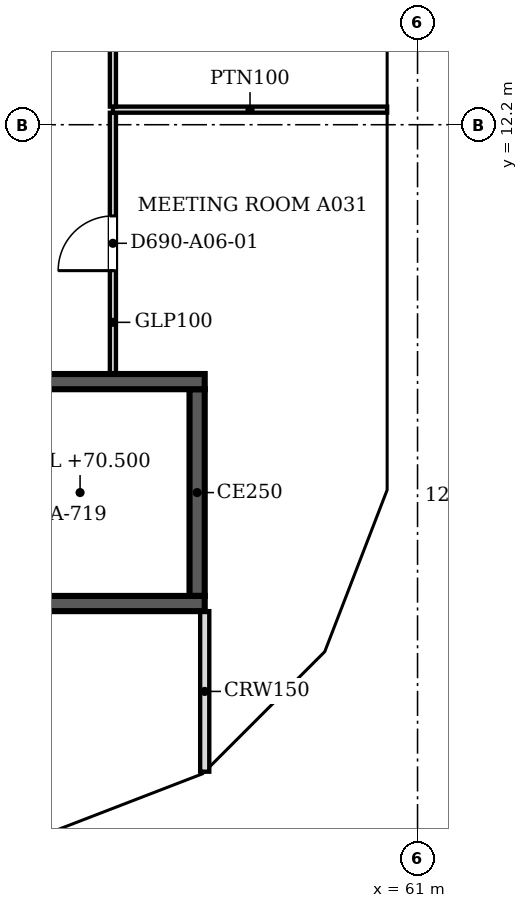
"""IFC4 building model, lengths in metres.
Left out: names, types, materials, properties, quantities, classifications, styles, units other than length and angle.
Written with IfcOpenShell. Run it as: python <this file> out.ifc"""

import sys

from ifc_helpers import new_model, si_unit, direction, frame, frame_2d, origin, place, context, subcontext, project, spatial, polyline, rectangle, outline, extrude, faceted_brep, source, transform, mapped, element, fill, save


model = new_model("IFC4")
c1 = context("Model", 3, precision=1e-05, world=origin(), true_north=direction((0.0, 1.0)))
c2 = subcontext(c1, "Body", "Model", "MODEL_VIEW")
j1 = project(units=[si_unit("LENGTHUNIT", "METRE"), si_unit("PLANEANGLEUNIT", "RADIAN")], contexts=[c1])
p1 = place(None, origin())
s1 = spatial("IfcSite", under=j1, at=p1, CompositionType="ELEMENT")
p2 = place(p1, origin())
s2 = spatial("IfcBuilding", under=s1, at=p2, CompositionType="ELEMENT")
p3 = place(p2, frame((0.0, 0.0, 68.6)))
s3 = spatial("IfcBuildingStorey", under=s2, at=p3, CompositionType="ELEMENT", Elevation=68.6)
m1 = source(origin(), c2, "Body", "Brep", [
    faceted_brep([(2.997, -0.25, 0.0), (0.047, -0.25, 3.8), (0.0, -0.25, 3.741), (0.0, -0.25, 0.0), (0.093, 0.25, 3.74), (2.944, 0.25, 0.068), (2.944, 0.25, 0.0), (0.093, 0.25, 0.0), (0.047, 0.0, 3.8), (2.997, 0.0, 0.0)], [[[0, 1, 2, 3]], [[4, 5, 6, 7]], [[5, 4, 8, 1, 0, 9]], [[2, 1, 8]], [[7, 6, 9, 0, 3]], [[7, 3, 2, 8, 4]], [[9, 6, 5]]]),
])
p4 = place(p3, frame((54.81, 0.233, 0.0), z_axis=(0.0, 0.0, 1.0), x_axis=(0.932990326376, 0.359901446078, 0.0)))
e1 = element("IfcWall", 1, at=p4, inside=s3, PredefinedType="SOLIDWALL", context=c2, shape_type="MappedRepresentation", body=[
    mapped(m1, transform((0.0, 0.0, 0.0), scale=1.0)),
])
m2 = source(origin(), c2, "Body", "SweptSolid", [
    extrude(outline(polyline([(2.487, 0.25), (0.247, 3.135), (0.247, 0.25), (2.487, 0.25)])), frame((0.0, 0.26, 0.0), z_axis=(0.0, -1.0, 0.0), x_axis=(1.0, 0.0, 0.0)), (0.0, 0.0, 1.0), 0.52),
])
p5 = place(p4, origin())
e2 = element("IfcOpeningElement", 2, at=p5, cuts=e1, PredefinedType="OPENING", context=c2, shape_type="MappedRepresentation", body=[
    mapped(m2, transform((0.0, 0.0, 0.0), scale=1.0)),
])
m3 = source(origin(), c2, "Body", "Brep", [
    faceted_brep([(2.997, -0.25, 3.732), (2.944, -0.25, 3.8), (0.0, -0.25, 0.0), (2.997, -0.25, 0.0), (0.053, 0.25, 0.068), (2.891, 0.25, 3.732), (2.891, 0.25, 0.0), (0.053, 0.25, 0.0), (2.944, 0.0, 3.8), (0.0, 0.0, 0.0)], [[[0, 1, 2, 3]], [[4, 5, 6, 7]], [[8, 1, 0]], [[5, 4, 9, 2, 1, 8]], [[7, 6, 3, 2, 9]], [[7, 9, 4]], [[3, 6, 5, 8, 0]]]),
])
p6 = place(p3, frame((57.606, 1.312, 0.0), z_axis=(0.0, 0.0, 1.0), x_axis=(0.707147509625, 0.707066050402, 0.0)))
e3 = element("IfcWall", 3, at=p6, inside=s3, PredefinedType="SOLIDWALL", context=c2, shape_type="MappedRepresentation", body=[
    mapped(m3, transform((0.0, 0.0, 0.0), scale=1.0)),
])
m4 = source(origin(), c2, "Body", "SweptSolid", [
    extrude(outline(polyline([(2.744, 3.134), (0.51, 0.25), (2.744, 0.25), (2.744, 3.134)])), frame((0.0, 0.26, 0.0), z_axis=(0.0, -1.0, 0.0), x_axis=(1.0, 0.0, 0.0)), (0.0, 0.0, 1.0), 0.52),
])
p7 = place(p6, origin())
e4 = element("IfcOpeningElement", 4, at=p7, cuts=e3, PredefinedType="OPENING", context=c2, shape_type="MappedRepresentation", body=[
    mapped(m4, transform((0.0, 0.0, 0.0), scale=1.0)),
])
m5 = source(origin(), c2, "Body", "Brep", [
    faceted_brep([(3.003, -0.25, 0.0), (0.053, -0.25, 3.8), (0.0, -0.25, 3.731), (0.0, -0.25, 0.0), (0.106, 0.25, 3.732), (2.957, 0.25, 0.06), (2.957, 0.25, 0.0), (0.106, 0.25, 0.0), (0.053, 0.0, 3.8), (3.003, 0.0, 0.0)], [[[0, 1, 2, 3]], [[4, 5, 6, 7]], [[5, 4, 8, 1, 0, 9]], [[2, 1, 8]], [[7, 6, 9, 0, 3]], [[7, 3, 2, 8, 4]], [[9, 6, 5]]]),
])
p8 = place(p3, frame((59.669, 3.344, 0.0), z_axis=(0.0, 0.0, 1.0), x_axis=(0.35992665181, 0.932980602862, 0.0)))
e5 = element("IfcWall", 5, at=p8, inside=s3, PredefinedType="SOLIDWALL", context=c2, shape_type="MappedRepresentation", body=[
    mapped(m5, transform((0.0, 0.0, 0.0), scale=1.0)),
])
m6 = source(origin(), c2, "Body", "SweptSolid", [
    extrude(outline(polyline([(2.493, 0.25), (0.253, 3.135), (0.253, 0.25), (2.493, 0.25)])), frame((0.0, 0.26, 0.0), z_axis=(0.0, -1.0, 0.0), x_axis=(1.0, 0.0, 0.0)), (0.0, 0.0, 1.0), 0.52),
])
p9 = place(p8, origin())
e6 = element("IfcOpeningElement", 6, at=p9, cuts=e5, PredefinedType="OPENING", context=c2, shape_type="MappedRepresentation", body=[
    mapped(m6, transform((0.0, 0.0, 0.0), scale=1.0)),
])
m7 = source(origin(), c2, "Body", "Brep", [
    faceted_brep([(6.053, -0.25, 0.0), (3.003, -0.25, 3.8), (0.0, -0.25, 0.0), (0.047, 0.25, 0.059), (3.003, 0.25, 3.8), (6.053, 0.25, 0.0), (0.047, 0.25, 0.0), (0.0, 0.0, 0.0)], [[[0, 1, 2]], [[3, 4, 5, 6]], [[5, 4, 1, 0]], [[4, 3, 7, 2, 1]], [[6, 5, 0, 2, 7]], [[6, 7, 3]]]),
])
p10 = place(p3, frame((60.75, 6.146, 0.0), z_axis=(0.0, 0.0, 1.0), x_axis=(0.0, 1.0, 0.0)))
e7 = element("IfcWall", 7, at=p10, inside=s3, PredefinedType="SOLIDWALL", context=c2, shape_type="MappedRepresentation", body=[
    mapped(m7, transform((0.0, 0.0, 0.0), scale=1.0)),
])
m8 = source(origin(), c2, "Body", "SweptSolid", [
    extrude(outline(polyline([(5.532, 0.25), (3.005, 3.399), (0.516, 0.25), (5.532, 0.25)])), frame((0.0, 0.26, 0.0), z_axis=(0.0, -1.0, 0.0), x_axis=(1.0, 0.0, 0.0)), (0.0, 0.0, 1.0), 0.52),
])
p11 = place(p10, origin())
e8 = element("IfcOpeningElement", 8, at=p11, cuts=e7, PredefinedType="OPENING", context=c2, shape_type="MappedRepresentation", body=[
    mapped(m8, transform((0.0, 0.0, 0.0), scale=1.0)),
])
m9 = source(origin(), c2, "Body", "SweptSolid", [
    extrude(outline(polyline([(6.1, 0.0), (3.05, 3.8), (0.0, 0.0), (6.1, 0.0)])), frame((0.0, 0.25, 0.0), z_axis=(0.0, -1.0, 0.0), x_axis=(1.0, 0.0, 0.0)), (0.0, 0.0, 1.0), 0.5),
])
p12 = place(p3, frame((60.75, 12.2, 0.0), z_axis=(0.0, 0.0, 1.0), x_axis=(0.0, 1.0, 0.0)))
e9 = element("IfcWall", 9, at=p12, inside=s3, PredefinedType="SOLIDWALL", context=c2, shape_type="MappedRepresentation", body=[
    mapped(m9, transform((0.0, 0.0, 0.0), scale=1.0)),
])
m10 = source(origin(), c2, "Body", "SweptSolid", [
    extrude(outline(polyline([(5.579, 0.25), (3.05, 3.4), (0.521, 0.25), (5.579, 0.25)])), frame((0.0, 0.26, 0.0), z_axis=(0.0, -1.0, 0.0), x_axis=(1.0, 0.0, 0.0)), (0.0, 0.0, 1.0), 0.52),
])
p13 = place(p12, origin())
e10 = element("IfcOpeningElement", 10, at=p13, cuts=e9, PredefinedType="OPENING", context=c2, shape_type="MappedRepresentation", body=[
    mapped(m10, transform((0.0, 0.0, 0.0), scale=1.0)),
])
p14 = place(p2, frame((0.0, 0.0, 72.4)))
s4 = spatial("IfcBuildingStorey", under=s2, at=p14, CompositionType="ELEMENT", Elevation=72.4)
m11 = source(origin(), c2, "Body", "Brep", [
    faceted_brep([(2.95, -0.25, 0.0), (3.003, -0.25, 0.068), (3.003, -0.25, 7.531), (2.95, -0.25, 7.6), (0.0, -0.25, 3.8), (0.047, 0.25, 3.86), (2.898, 0.25, 7.532), (2.898, 0.25, 0.068), (0.047, 0.25, 3.74), (2.95, 0.0, 0.0), (2.95, 0.0, 7.6), (0.0, 0.0, 3.8)], [[[0, 1, 2, 3, 4]], [[5, 6, 7, 8]], [[1, 0, 9]], [[10, 3, 2]], [[6, 5, 11, 4, 3, 10]], [[8, 7, 9, 0, 4, 11]], [[8, 11, 5]], [[1, 9, 7, 6, 10, 2]]]),
])
p15 = place(p14, frame((54.854, 0.25, -3.8), z_axis=(0.0, 0.0, 1.0), x_axis=(0.932970071518, 0.359953949349, 0.0)))
e11 = element("IfcWall", 11, at=p15, inside=s4, PredefinedType="SOLIDWALL", context=c2, shape_type="MappedRepresentation", body=[
    mapped(m11, transform((0.0, 0.0, 0.0), scale=1.0)),
])
m12 = source(origin(), c2, "Body", "SweptSolid", [
    extrude(outline(polyline([(2.75, 6.935), (0.316, 3.8), (2.75, 0.665), (2.75, 6.935)])), frame((0.0, 0.26, 0.0), z_axis=(0.0, -1.0, 0.0), x_axis=(1.0, 0.0, 0.0)), (0.0, 0.0, 1.0), 0.52),
])
p16 = place(p15, origin())
e12 = element("IfcOpeningElement", 12, at=p16, cuts=e11, PredefinedType="OPENING", context=c2, shape_type="MappedRepresentation", body=[
    mapped(m12, transform((0.0, 0.0, 0.0), scale=1.0)),
])
m13 = source(origin(), c2, "Body", "Brep", [
    faceted_brep([(0.053, -0.25, 0.0), (2.997, -0.25, 3.8), (0.053, -0.25, 7.6), (0.0, -0.25, 7.532), (0.0, -0.25, 0.068), (0.106, 0.25, 7.531), (2.944, 0.25, 3.868), (2.944, 0.25, 3.732), (0.106, 0.25, 0.068), (2.997, 0.0, 3.8), (0.053, 0.0, 0.0), (0.053, 0.0, 7.6)], [[[0, 1, 2, 3, 4]], [[5, 6, 7, 8]], [[8, 7, 9, 1, 0, 10]], [[6, 5, 11, 2, 1, 9]], [[3, 2, 11]], [[10, 0, 4]], [[8, 10, 4, 3, 11, 5]], [[9, 7, 6]]]),
])
p17 = place(p14, frame((57.569, 1.274, -3.8), z_axis=(0.0, 0.0, 1.0), x_axis=(0.707066050402, 0.707147509625, 0.0)))
e13 = element("IfcWall", 13, at=p17, inside=s4, PredefinedType="SOLIDWALL", context=c2, shape_type="MappedRepresentation", body=[
    mapped(m13, transform((0.0, 0.0, 0.0), scale=1.0)),
])
m14 = source(origin(), c2, "Body", "SweptSolid", [
    extrude(outline(polyline([(0.253, 0.666), (2.681, 3.8), (0.253, 6.934), (0.253, 0.666)])), frame((0.0, 0.26, 0.0), z_axis=(0.0, -1.0, 0.0), x_axis=(1.0, 0.0, 0.0)), (0.0, 0.0, 1.0), 0.52),
])
p18 = place(p17, origin())
e14 = element("IfcOpeningElement", 14, at=p18, cuts=e13, PredefinedType="OPENING", context=c2, shape_type="MappedRepresentation", body=[
    mapped(m14, transform((0.0, 0.0, 0.0), scale=1.0)),
])
m15 = source(origin(), c2, "Body", "Brep", [
    faceted_brep([(2.95, -0.25, 0.0), (2.997, -0.25, 0.059), (2.997, -0.25, 7.541), (2.95, -0.25, 7.6), (0.0, -0.25, 3.8), (0.053, 0.25, 3.868), (2.904, 0.25, 7.54), (2.904, 0.25, 0.06), (0.053, 0.25, 3.732), (2.95, 0.0, 0.0), (2.95, 0.0, 7.6), (0.0, 0.0, 3.8)], [[[0, 1, 2, 3, 4]], [[5, 6, 7, 8]], [[1, 0, 9]], [[10, 3, 2]], [[6, 5, 11, 4, 3, 10]], [[8, 7, 9, 0, 4, 11]], [[8, 11, 5]], [[1, 9, 7, 6, 10, 2]]]),
])
p19 = place(p14, frame((59.688, 3.394, -3.8), z_axis=(0.0, 0.0, 1.0), x_axis=(0.359972353723, 0.932962970624, 0.0)))
e15 = element("IfcWall", 15, at=p19, inside=s4, PredefinedType="SOLIDWALL", context=c2, shape_type="MappedRepresentation", body=[
    mapped(m15, transform((0.0, 0.0, 0.0), scale=1.0)),
])
p20 = place(p19, origin())
e16 = element("IfcOpeningElement", 16, at=p20, cuts=e15, PredefinedType="OPENING", context=c2, shape_type="MappedRepresentation", body=[
    mapped(m12, transform((0.0, 0.0, 0.0), scale=1.0)),
])
m16 = source(origin(), c2, "Body", "Brep", [
    faceted_brep([(0.047, -0.25, 0.0), (3.05, -0.25, 3.8), (0.047, -0.25, 7.6), (0.0, -0.25, 7.54), (0.0, -0.25, 0.06), (0.093, 0.25, 7.541), (3.05, 0.25, 3.8), (0.093, 0.25, 0.059), (0.047, 0.0, 0.0), (0.047, 0.0, 7.6)], [[[0, 1, 2, 3, 4]], [[5, 6, 7]], [[7, 6, 1, 0, 8]], [[6, 5, 9, 2, 1]], [[3, 2, 9]], [[8, 0, 4]], [[7, 8, 4, 3, 9, 5]]]),
])
p21 = place(p14, frame((60.75, 6.1, -3.8), z_axis=(0.0, 0.0, 1.0), x_axis=(0.0, 1.0, 0.0)))
e17 = element("IfcWall", 17, at=p21, inside=s4, PredefinedType="SOLIDWALL", context=c2, shape_type="MappedRepresentation", body=[
    mapped(m16, transform((0.0, 0.0, 0.0), scale=1.0)),
])
m17 = source(origin(), c2, "Body", "SweptSolid", [
    extrude(outline(polyline([(0.247, 0.656), (2.731, 3.8), (0.247, 6.944), (0.247, 0.656)])), frame((0.0, 0.26, 0.0), z_axis=(0.0, -1.0, 0.0), x_axis=(1.0, 0.0, 0.0)), (0.0, 0.0, 1.0), 0.52),
])
p22 = place(p21, origin())
e18 = element("IfcOpeningElement", 18, at=p22, cuts=e17, PredefinedType="OPENING", context=c2, shape_type="MappedRepresentation", body=[
    mapped(m17, transform((0.0, 0.0, 0.0), scale=1.0)),
])
m18 = source(origin(), c2, "Body", "SweptSolid", [
    extrude(outline(polyline([(3.05, 0.0), (6.1, 3.8), (3.05, 7.6), (0.0, 3.8), (3.05, 0.0)])), frame((0.0, 0.25, 0.0), z_axis=(0.0, -1.0, 0.0), x_axis=(1.0, 0.0, 0.0)), (0.0, 0.0, 1.0), 0.5),
])
p23 = place(p14, frame((60.75, 9.15, -3.8), z_axis=(0.0, 0.0, 1.0), x_axis=(0.0, 1.0, 0.0)))
e19 = element("IfcWall", 19, at=p23, inside=s4, PredefinedType="SOLIDWALL", context=c2, shape_type="MappedRepresentation", body=[
    mapped(m18, transform((0.0, 0.0, 0.0), scale=1.0)),
])
m19 = source(origin(), c2, "Body", "SweptSolid", [
    extrude(outline(polyline([(3.05, 0.399), (5.78, 3.8), (3.05, 7.2), (0.321, 3.8), (3.05, 0.399)])), frame((0.0, 0.26, 0.0), z_axis=(0.0, -1.0, 0.0), x_axis=(1.0, 0.0, 0.0)), (0.0, 0.0, 1.0), 0.52),
])
p24 = place(p23, origin())
e20 = element("IfcOpeningElement", 20, at=p24, cuts=e19, PredefinedType="OPENING", context=c2, shape_type="MappedRepresentation", body=[
    mapped(m19, transform((0.0, 0.0, 0.0), scale=1.0)),
])
p25 = place(p3, frame((57.5, 4.325, 0.0), z_axis=(0.0, 0.0, 1.0), x_axis=(-1.0, 0.0, 0.0)))
e21 = element("IfcWall", 21, at=p25, inside=s3, PredefinedType="SOLIDWALL", context=c2, shape_type="SweptSolid", body=[
    extrude(rectangle(XDim=8.5, YDim=0.25, at=frame_2d((4.25, 0.0))), origin(), (0.0, 0.0, 1.0), 3.8),
])
m20 = source(origin(), c2, "Body", "SweptSolid", [
    extrude(rectangle(XDim=1.2, YDim=2.1, at=frame_2d((0.6, 1.05))), frame((0.0, 0.135, 0.0), z_axis=(0.0, -1.0, 0.0), x_axis=(1.0, 0.0, 0.0)), (0.0, 0.0, 1.0), 0.27),
])
p26 = place(p25, frame((6.9, 0.0, 0.0)))
e22 = element("IfcOpeningElement", 22, at=p26, cuts=e21, PredefinedType="OPENING", context=c2, shape_type="MappedRepresentation", body=[
    mapped(m20, transform((0.0, 0.0, 0.0), scale=1.0)),
])
p27 = place(p3, frame((49.0, 7.975, 0.0), z_axis=(0.0, 0.0, 1.0), x_axis=(1.0, 0.0, 0.0)))
e23 = element("IfcWall", 23, at=p27, inside=s3, PredefinedType="SOLIDWALL", context=c2, shape_type="SweptSolid", body=[
    extrude(rectangle(XDim=8.5, YDim=0.25, at=frame_2d((4.25, 0.0))), origin(), (0.0, 0.0, 1.0), 3.8),
])
p28 = place(p3, frame((57.375, 7.85, 0.0), z_axis=(0.0, 0.0, 1.0), x_axis=(0.0, -1.0, 0.0)))
e24 = element("IfcWall", 24, at=p28, inside=s3, PredefinedType="SOLIDWALL", context=c2, shape_type="SweptSolid", body=[
    extrude(rectangle(XDim=3.4, YDim=0.25, at=frame_2d((1.7, 0.0))), origin(), (0.0, 0.0, 1.0), 3.8),
])
p29 = place(p3, frame((57.5, 1.559, 0.0), z_axis=(0.0, 0.0, 1.0), x_axis=(0.0, 1.0, 0.0)))
e25 = element("IfcWall", 25, at=p29, inside=s3, PredefinedType="PARTITIONING", context=c2, shape_type="SweptSolid", body=[
    extrude(rectangle(XDim=2.641, YDim=0.15, at=frame_2d((1.32, 0.0))), origin(), (0.0, 0.0, 1.0), 3.067),
])
p30 = place(p3, frame((55.99, 12.397, 0.0), z_axis=(0.0, 0.0, 1.0), x_axis=(0.0, -1.0, 0.0)))
e26 = element("IfcWall", 26, at=p30, inside=s3, PredefinedType="PARTITIONING", context=c2, shape_type="SweptSolid", body=[
    extrude(rectangle(XDim=4.297, YDim=0.1, at=frame_2d((2.148, 0.0))), origin(), (0.0, 0.0, 1.0), 3.067),
])
m21 = source(origin(), c2, "Body", "SweptSolid", [
    extrude(rectangle(XDim=0.9, YDim=2.1, at=frame_2d((0.45, 1.05))), frame((0.0, 0.06, 0.0), z_axis=(0.0, -1.0, 0.0), x_axis=(1.0, 0.0, 0.0)), (0.0, 0.0, 1.0), 0.12),
])
p31 = place(p30, frame((1.697, 0.0, 0.0)))
e27 = element("IfcOpeningElement", 27, at=p31, cuts=e26, PredefinedType="OPENING", context=c2, shape_type="MappedRepresentation", body=[
    mapped(m21, transform((0.0, 0.0, 0.0), scale=1.0)),
])
p32 = place(p3, frame((55.99, 12.448, 0.0), z_axis=(0.0, 0.0, 1.0), x_axis=(1.0, 0.0, 0.0)))
e28 = element("IfcWall", 28, at=p32, inside=s3, PredefinedType="PARTITIONING", context=c2, shape_type="SweptSolid", body=[
    extrude(rectangle(XDim=4.51, YDim=0.1, at=frame_2d((2.255, 0.0))), origin(), (0.0, 0.0, 1.0), 3.067),
])
p33 = place(p3, frame((55.99, 17.024, 0.0), z_axis=(0.0, 0.0, 1.0), x_axis=(0.0, -1.0, 0.0)))
e29 = element("IfcWall", 29, at=p33, inside=s3, PredefinedType="PARTITIONING", context=c2, shape_type="SweptSolid", body=[
    extrude(rectangle(XDim=4.525, YDim=0.1, at=frame_2d((2.263, 0.0))), origin(), (0.0, 0.0, 1.0), 3.067),
])
p34 = place(p33, frame((1.825, 0.0, 0.0)))
e30 = element("IfcOpeningElement", 30, at=p34, cuts=e29, PredefinedType="OPENING", context=c2, shape_type="MappedRepresentation", body=[
    mapped(m21, transform((0.0, 0.0, 0.0), scale=1.0)),
])
m22 = source(origin(), c2, "Body", "SweptSolid", [
    extrude(rectangle(XDim=0.9, YDim=2.1, at=frame_2d((0.45, 1.05))), frame((0.0, 0.025, 0.0), z_axis=(0.0, -1.0, 0.0), x_axis=(1.0, 0.0, 0.0)), (0.0, 0.0, 1.0), 0.05),
])
p35 = place(p31, origin())
e31 = element("IfcDoor", 31, at=p35, inside=s3, OperationType="SINGLE_SWING_RIGHT", PredefinedType="DOOR", context=c2, shape_type="MappedRepresentation", body=[
    mapped(m22, transform((0.0, 0.0, 0.0), scale=1.0)),
])
fill(e27, e31)
save(model, sys.argv[1])
